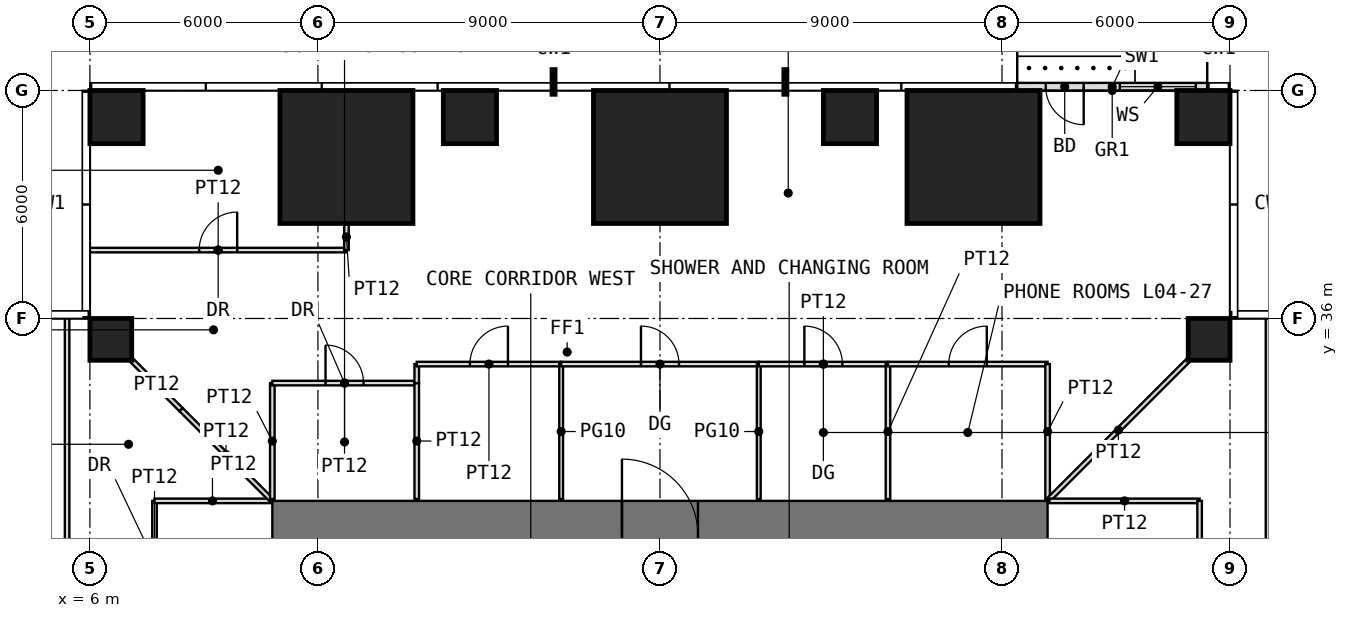
"""IFC4 building model, lengths in metres.
Left out: names, types, materials, properties, quantities, classifications, styles, units other than length and angle.
Written with IfcOpenShell. Run it as: python <this file> out.ifc"""

import sys

from ifc_helpers import new_model, si_unit, direction, frame, frame_2d, origin, origin_2d, place, context, subcontext, project, spatial, rectangle, extrude, element, fill, save


model = new_model("IFC4")
c1 = context("Model", 3, precision=1e-05, world=origin(), true_north=direction((0.0, 1.0)))
c2 = subcontext(c1, "Body", "Model", "MODEL_VIEW")
j1 = project(units=[si_unit("LENGTHUNIT", "METRE"), si_unit("PLANEANGLEUNIT", "RADIAN")], contexts=[c1])
p1 = place(None, origin())
s1 = spatial("IfcSite", under=j1, at=p1, CompositionType="ELEMENT")
p2 = place(p1, origin())
s2 = spatial("IfcBuilding", under=s1, at=p2, CompositionType="ELEMENT")
p3 = place(p2, frame((0.0, 0.0, 22.5)))
s3 = spatial("IfcBuildingStorey", under=s2, at=p3, CompositionType="ELEMENT", Elevation=22.5)
for number, where, z_axis, x_axis in (
    (1, (6.55, 35.45, 0.0), (0.0, 0.0, 1.0), (1.0, 0.0, 0.0)),
    (2, (35.45, 35.45, 0.0), (0.0, 0.0, 1.0), (1.0, 0.0, 0.0)),
):
    element("IfcColumn", number, at=place(p3, frame(where, z_axis=z_axis, x_axis=x_axis)), inside=s3, PredefinedType="COLUMN", context=c2, shape_type="SweptSolid", body=[
        extrude(rectangle(XDim=1.1, YDim=1.1, at=origin_2d()), origin(), (0.0, 0.0, 1.0), 4.0),
    ])
p4 = place(p3, frame((6.7, 41.3, 0.0), z_axis=(0.0, 0.0, 1.0), x_axis=(1.0, 0.0, 0.0)))
e3 = element("IfcColumn", 3, at=p4, inside=s3, PredefinedType="COLUMN", context=c2, shape_type="SweptSolid", body=[
    extrude(rectangle(XDim=1.4, YDim=1.4, at=origin_2d()), origin(), (0.0, 0.0, 1.0), 4.0),
])
p5 = place(p3, frame((12.75, 40.25, 0.0), z_axis=(0.0, 0.0, 1.0), x_axis=(1.0, 0.0, 0.0)))
e4 = element("IfcColumn", 4, at=p5, inside=s3, PredefinedType="COLUMN", context=c2, shape_type="SweptSolid", body=[
    extrude(rectangle(XDim=3.5, YDim=3.5, at=origin_2d()), origin(), (0.0, 0.0, 1.0), 4.0),
])
p6 = place(p3, frame((16.0, 41.3, 0.0), z_axis=(0.0, 0.0, 1.0), x_axis=(1.0, 0.0, 0.0)))
e5 = element("IfcColumn", 5, at=p6, inside=s3, PredefinedType="COLUMN", context=c2, shape_type="SweptSolid", body=[
    extrude(rectangle(XDim=1.4, YDim=1.4, at=origin_2d()), origin(), (0.0, 0.0, 1.0), 4.0),
])
p7 = place(p3, frame((21.0, 40.25, 0.0), z_axis=(0.0, 0.0, 1.0), x_axis=(1.0, 0.0, 0.0)))
e6 = element("IfcColumn", 6, at=p7, inside=s3, PredefinedType="COLUMN", context=c2, shape_type="SweptSolid", body=[
    extrude(rectangle(XDim=3.5, YDim=3.5, at=origin_2d()), origin(), (0.0, 0.0, 1.0), 4.0),
])
p8 = place(p3, frame((26.0, 41.3, 0.0), z_axis=(0.0, 0.0, 1.0), x_axis=(1.0, 0.0, 0.0)))
e7 = element("IfcColumn", 7, at=p8, inside=s3, PredefinedType="COLUMN", context=c2, shape_type="SweptSolid", body=[
    extrude(rectangle(XDim=1.4, YDim=1.4, at=origin_2d()), origin(), (0.0, 0.0, 1.0), 4.0),
])
p9 = place(p3, frame((29.25, 40.25, 0.0), z_axis=(0.0, 0.0, 1.0), x_axis=(1.0, 0.0, 0.0)))
e8 = element("IfcColumn", 8, at=p9, inside=s3, PredefinedType="COLUMN", context=c2, shape_type="SweptSolid", body=[
    extrude(rectangle(XDim=3.5, YDim=3.5, at=origin_2d()), origin(), (0.0, 0.0, 1.0), 4.0),
])
p10 = place(p3, frame((35.3, 41.3, 0.0), z_axis=(0.0, 0.0, 1.0), x_axis=(1.0, 0.0, 0.0)))
e9 = element("IfcColumn", 9, at=p10, inside=s3, PredefinedType="COLUMN", context=c2, shape_type="SweptSolid", body=[
    extrude(rectangle(XDim=1.4, YDim=1.4, at=origin_2d()), origin(), (0.0, 0.0, 1.0), 4.0),
])
p11 = place(p3, frame((35.4, 42.1, 0.0), z_axis=(0.0, 0.0, 1.0), x_axis=(-1.0, 0.0, 0.0)))
e10 = element("IfcWall", 10, at=p11, inside=s3, PredefinedType="USERDEFINED", context=c2, shape_type="SweptSolid", body=[
    extrude(rectangle(XDim=5.0, YDim=0.2, at=frame_2d((2.5, 0.0))), origin(), (0.0, 0.0, 1.0), 3.75),
])
p12 = place(p11, frame((3.25, 0.0, 0.0)))
e11 = element("IfcOpeningElement", 11, at=p12, cuts=e10, PredefinedType="OPENING", context=c2, shape_type="SweptSolid", body=[
    extrude(rectangle(XDim=1.0, YDim=2.4, at=frame_2d((0.5, 1.2))), frame((0.0, 0.11, 0.0), z_axis=(0.0, -1.0, 0.0), x_axis=(1.0, 0.0, 0.0)), (0.0, 0.0, 1.0), 0.22),
])
p13 = place(p11, frame((0.3, 0.0, 0.3)))
e12 = element("IfcOpeningElement", 12, at=p13, cuts=e10, PredefinedType="OPENING", context=c2, shape_type="SweptSolid", body=[
    extrude(rectangle(XDim=2.0, YDim=2.7, at=frame_2d((1.0, 1.35))), frame((0.0, 0.11, 0.0), z_axis=(0.0, -1.0, 0.0), x_axis=(1.0, 0.0, 0.0)), (0.0, 0.0, 1.0), 0.22),
])
p14 = place(p3, frame((10.8, 30.3, -0.05), z_axis=(0.0, 0.0, 1.0), x_axis=(1.0, 0.0, 0.0)))
e13 = element("IfcWall", 13, at=p14, inside=s3, PredefinedType="SHEAR", context=c2, shape_type="SweptSolid", body=[
    extrude(rectangle(XDim=20.4, YDim=1.8, at=frame_2d((10.2, 0.0))), origin(), (0.0, 0.0, 1.0), 4.0),
])
p15 = place(p14, frame((9.2, 0.0, 0.05)))
e14 = element("IfcOpeningElement", 14, at=p15, cuts=e13, PredefinedType="OPENING", context=c2, shape_type="SweptSolid", body=[
    extrude(rectangle(XDim=2.0, YDim=2.2, at=frame_2d((1.0, 1.1))), frame((0.0, 0.91, 0.0), z_axis=(0.0, -1.0, 0.0), x_axis=(1.0, 0.0, 0.0)), (0.0, 0.0, 1.0), 1.82),
])
p16 = place(p3, frame((5.4, 6.0, 0.0), z_axis=(0.0, 0.0, 1.0), x_axis=(0.0, 1.0, 0.0)))
e15 = element("IfcWall", 15, at=p16, inside=s3, PredefinedType="PARTITIONING", context=c2, shape_type="SweptSolid", body=[
    extrude(rectangle(XDim=30.0, YDim=0.12, at=frame_2d((15.0, 0.0))), origin(), (0.0, 0.0, 1.0), 3.75),
])
p17 = place(p16, frame((14.5, 0.0, 0.0)))
e16 = element("IfcOpeningElement", 16, at=p17, cuts=e15, PredefinedType="OPENING", context=c2, shape_type="SweptSolid", body=[
    extrude(rectangle(XDim=1.0, YDim=2.4, at=frame_2d((0.5, 1.2))), frame((0.0, 0.07, 0.0), z_axis=(0.0, -1.0, 0.0), x_axis=(1.0, 0.0, 0.0)), (0.0, 0.0, 1.0), 0.14),
])
p18 = place(p3, frame((6.0, 37.8, 0.0), z_axis=(0.0, 0.0, 1.0), x_axis=(1.0, 0.0, 0.0)))
e17 = element("IfcWall", 17, at=p18, inside=s3, PredefinedType="PARTITIONING", context=c2, shape_type="SweptSolid", body=[
    extrude(rectangle(XDim=6.75, YDim=0.12, at=frame_2d((3.375, 0.0))), origin(), (0.0, 0.0, 1.0), 3.75),
])
p19 = place(p18, frame((2.875, 0.0, 0.0)))
e18 = element("IfcOpeningElement", 18, at=p19, cuts=e17, PredefinedType="OPENING", context=c2, shape_type="SweptSolid", body=[
    extrude(rectangle(XDim=1.0, YDim=2.2, at=frame_2d((0.5, 1.1))), frame((0.0, 0.07, 0.0), z_axis=(0.0, -1.0, 0.0), x_axis=(1.0, 0.0, 0.0)), (0.0, 0.0, 1.0), 0.14),
])
p20 = place(p3, frame((7.11, 34.89, 0.0), z_axis=(0.0, 0.0, 1.0), x_axis=(0.707106781187, -0.707106781187, 0.0)))
e19 = element("IfcWall", 19, at=p20, inside=s3, PredefinedType="PARTITIONING", context=c2, shape_type="SweptSolid", body=[
    extrude(rectangle(XDim=1.822, YDim=0.12, at=frame_2d((0.911, 0.0))), origin(), (0.0, 0.0, 1.0), 3.75),
])
p21 = place(p3, frame((7.7, 28.0, 0.0), z_axis=(0.0, 0.0, 1.0), x_axis=(0.0, 1.0, 0.0)))
e20 = element("IfcWall", 20, at=p21, inside=s3, PredefinedType="PARTITIONING", context=c2, shape_type="SweptSolid", body=[
    extrude(rectangle(XDim=3.2, YDim=0.12, at=frame_2d((1.6, 0.0))), origin(), (0.0, 0.0, 1.0), 3.75),
])
p22 = place(p21, frame((1.1, 0.0, 0.0)))
e21 = element("IfcOpeningElement", 21, at=p22, cuts=e20, PredefinedType="OPENING", context=c2, shape_type="SweptSolid", body=[
    extrude(rectangle(XDim=1.0, YDim=2.2, at=frame_2d((0.5, 1.1))), frame((0.0, 0.07, 0.0), z_axis=(0.0, -1.0, 0.0), x_axis=(1.0, 0.0, 0.0)), (0.0, 0.0, 1.0), 0.14),
])
p23 = place(p3, frame((7.7, 31.2, 0.0), z_axis=(0.0, 0.0, 1.0), x_axis=(1.0, 0.0, 0.0)))
e22 = element("IfcWall", 22, at=p23, inside=s3, PredefinedType="PARTITIONING", context=c2, shape_type="SweptSolid", body=[
    extrude(rectangle(XDim=3.05, YDim=0.12, at=frame_2d((1.525, 0.0))), origin(), (0.0, 0.0, 1.0), 3.75),
])
p24 = place(p3, frame((8.398, 33.602, 0.0), z_axis=(0.0, 0.0, 1.0), x_axis=(0.707106781187, -0.707106781187, 0.0)))
e23 = element("IfcWall", 23, at=p24, inside=s3, PredefinedType="PARTITIONING", context=c2, shape_type="SweptSolid", body=[
    extrude(rectangle(XDim=3.346, YDim=0.12, at=frame_2d((1.673, 0.0))), origin(), (0.0, 0.0, 1.0), 3.75),
])
p25 = place(p3, frame((10.8, 31.25, 0.0), z_axis=(0.0, 0.0, 1.0), x_axis=(0.0, 1.0, 0.0)))
e24 = element("IfcWall", 24, at=p25, inside=s3, PredefinedType="PARTITIONING", context=c2, shape_type="SweptSolid", body=[
    extrude(rectangle(XDim=3.05, YDim=0.12, at=frame_2d((1.525, 0.0))), origin(), (0.0, 0.0, 1.0), 3.75),
])
p26 = place(p3, frame((10.8, 34.3, 0.0), z_axis=(0.0, 0.0, 1.0), x_axis=(1.0, 0.0, 0.0)))
e25 = element("IfcWall", 25, at=p26, inside=s3, PredefinedType="PARTITIONING", context=c2, shape_type="SweptSolid", body=[
    extrude(rectangle(XDim=3.8, YDim=0.12, at=frame_2d((1.9, 0.0))), origin(), (0.0, 0.0, 1.0), 3.75),
])
p27 = place(p26, frame((1.4, 0.0, 0.0)))
e26 = element("IfcOpeningElement", 26, at=p27, cuts=e25, PredefinedType="OPENING", context=c2, shape_type="SweptSolid", body=[
    extrude(rectangle(XDim=1.0, YDim=2.2, at=frame_2d((0.5, 1.1))), frame((0.0, 0.07, 0.0), z_axis=(0.0, -1.0, 0.0), x_axis=(1.0, 0.0, 0.0)), (0.0, 0.0, 1.0), 0.14),
])
p28 = place(p3, frame((12.75, 37.8, 0.0), z_axis=(0.0, 0.0, 1.0), x_axis=(0.0, 1.0, 0.0)))
e27 = element("IfcWall", 27, at=p28, inside=s3, PredefinedType="PARTITIONING", context=c2, shape_type="SweptSolid", body=[
    extrude(rectangle(XDim=0.69, YDim=0.12, at=frame_2d((0.345, 0.0))), origin(), (0.0, 0.0, 1.0), 3.75),
])
p29 = place(p3, frame((14.6, 31.25, 0.0), z_axis=(0.0, 0.0, 1.0), x_axis=(0.0, 1.0, 0.0)))
e28 = element("IfcWall", 28, at=p29, inside=s3, PredefinedType="PARTITIONING", context=c2, shape_type="SweptSolid", body=[
    extrude(rectangle(XDim=3.05, YDim=0.12, at=frame_2d((1.525, 0.0))), origin(), (0.0, 0.0, 1.0), 3.75),
])
p30 = place(p3, frame((14.6, 34.3, 0.0), z_axis=(0.0, 0.0, 1.0), x_axis=(0.0, 1.0, 0.0)))
e29 = element("IfcWall", 29, at=p30, inside=s3, PredefinedType="PARTITIONING", context=c2, shape_type="SweptSolid", body=[
    extrude(rectangle(XDim=0.5, YDim=0.12, at=frame_2d((0.25, 0.0))), origin(), (0.0, 0.0, 1.0), 3.75),
])
p31 = place(p3, frame((14.6, 34.8, 0.0), z_axis=(0.0, 0.0, 1.0), x_axis=(1.0, 0.0, 0.0)))
e30 = element("IfcWall", 30, at=p31, inside=s3, PredefinedType="PARTITIONING", context=c2, shape_type="SweptSolid", body=[
    extrude(rectangle(XDim=3.8, YDim=0.12, at=frame_2d((1.9, 0.0))), origin(), (0.0, 0.0, 1.0), 3.75),
])
p32 = place(p31, frame((1.4, 0.0, 0.0)))
e31 = element("IfcOpeningElement", 31, at=p32, cuts=e30, PredefinedType="OPENING", context=c2, shape_type="SweptSolid", body=[
    extrude(rectangle(XDim=1.0, YDim=2.4, at=frame_2d((0.5, 1.2))), frame((0.0, 0.07, 0.0), z_axis=(0.0, -1.0, 0.0), x_axis=(1.0, 0.0, 0.0)), (0.0, 0.0, 1.0), 0.14),
])
p33 = place(p3, frame((18.4, 31.25, 0.0), z_axis=(0.0, 0.0, 1.0), x_axis=(0.0, 1.0, 0.0)))
e32 = element("IfcWall", 32, at=p33, inside=s3, PredefinedType="PARTITIONING", context=c2, shape_type="SweptSolid", body=[
    extrude(rectangle(XDim=3.55, YDim=0.1, at=frame_2d((1.775, 0.0))), origin(), (0.0, 0.0, 1.0), 3.75),
])
p34 = place(p3, frame((18.4, 34.8, 0.0), z_axis=(0.0, 0.0, 1.0), x_axis=(1.0, 0.0, 0.0)))
e33 = element("IfcWall", 33, at=p34, inside=s3, PredefinedType="PARTITIONING", context=c2, shape_type="SweptSolid", body=[
    extrude(rectangle(XDim=5.2, YDim=0.12, at=frame_2d((2.6, 0.0))), origin(), (0.0, 0.0, 1.0), 3.75),
])
p35 = place(p34, frame((2.1, 0.0, 0.0)))
e34 = element("IfcOpeningElement", 34, at=p35, cuts=e33, PredefinedType="OPENING", context=c2, shape_type="SweptSolid", body=[
    extrude(rectangle(XDim=1.0, YDim=2.4, at=frame_2d((0.5, 1.2))), frame((0.0, 0.07, 0.0), z_axis=(0.0, -1.0, 0.0), x_axis=(1.0, 0.0, 0.0)), (0.0, 0.0, 1.0), 0.14),
])
p36 = place(p3, frame((23.6, 31.25, 0.0), z_axis=(0.0, 0.0, 1.0), x_axis=(0.0, 1.0, 0.0)))
e35 = element("IfcWall", 35, at=p36, inside=s3, PredefinedType="PARTITIONING", context=c2, shape_type="SweptSolid", body=[
    extrude(rectangle(XDim=3.55, YDim=0.1, at=frame_2d((1.775, 0.0))), origin(), (0.0, 0.0, 1.0), 3.75),
])
p37 = place(p3, frame((23.6, 34.8, 0.0), z_axis=(0.0, 0.0, 1.0), x_axis=(1.0, 0.0, 0.0)))
e36 = element("IfcWall", 36, at=p37, inside=s3, PredefinedType="PARTITIONING", context=c2, shape_type="SweptSolid", body=[
    extrude(rectangle(XDim=3.4, YDim=0.12, at=frame_2d((1.7, 0.0))), origin(), (0.0, 0.0, 1.0), 3.75),
])
p38 = place(p37, frame((1.2, 0.0, 0.0)))
e37 = element("IfcOpeningElement", 37, at=p38, cuts=e36, PredefinedType="OPENING", context=c2, shape_type="SweptSolid", body=[
    extrude(rectangle(XDim=1.0, YDim=2.4, at=frame_2d((0.5, 1.2))), frame((0.0, 0.07, 0.0), z_axis=(0.0, -1.0, 0.0), x_axis=(1.0, 0.0, 0.0)), (0.0, 0.0, 1.0), 0.14),
])
p39 = place(p3, frame((27.0, 31.25, 0.0), z_axis=(0.0, 0.0, 1.0), x_axis=(0.0, 1.0, 0.0)))
e38 = element("IfcWall", 38, at=p39, inside=s3, PredefinedType="PARTITIONING", context=c2, shape_type="SweptSolid", body=[
    extrude(rectangle(XDim=3.55, YDim=0.12, at=frame_2d((1.775, 0.0))), origin(), (0.0, 0.0, 1.0), 3.75),
])
p40 = place(p3, frame((27.0, 34.8, 0.0), z_axis=(0.0, 0.0, 1.0), x_axis=(1.0, 0.0, 0.0)))
e39 = element("IfcWall", 39, at=p40, inside=s3, PredefinedType="PARTITIONING", context=c2, shape_type="SweptSolid", body=[
    extrude(rectangle(XDim=4.2, YDim=0.12, at=frame_2d((2.1, 0.0))), origin(), (0.0, 0.0, 1.0), 3.75),
])
p41 = place(p40, frame((1.6, 0.0, 0.0)))
e40 = element("IfcOpeningElement", 40, at=p41, cuts=e39, PredefinedType="OPENING", context=c2, shape_type="SweptSolid", body=[
    extrude(rectangle(XDim=1.0, YDim=2.4, at=frame_2d((0.5, 1.2))), frame((0.0, 0.07, 0.0), z_axis=(0.0, -1.0, 0.0), x_axis=(1.0, 0.0, 0.0)), (0.0, 0.0, 1.0), 0.14),
])
p42 = place(p3, frame((31.2, 31.25, 0.0), z_axis=(0.0, 0.0, 1.0), x_axis=(0.0, 1.0, 0.0)))
e41 = element("IfcWall", 41, at=p42, inside=s3, PredefinedType="PARTITIONING", context=c2, shape_type="SweptSolid", body=[
    extrude(rectangle(XDim=3.55, YDim=0.12, at=frame_2d((1.775, 0.0))), origin(), (0.0, 0.0, 1.0), 3.75),
])
p43 = place(p3, frame((31.235, 31.235, 0.0), z_axis=(0.0, 0.0, 1.0), x_axis=(0.707106781187, 0.707106781187, 0.0)))
e42 = element("IfcWall", 42, at=p43, inside=s3, PredefinedType="PARTITIONING", context=c2, shape_type="SweptSolid", body=[
    extrude(rectangle(XDim=5.168, YDim=0.12, at=frame_2d((2.584, 0.0))), origin(), (0.0, 0.0, 1.0), 3.75),
])
p44 = place(p3, frame((31.25, 31.2, 0.0), z_axis=(0.0, 0.0, 1.0), x_axis=(1.0, 0.0, 0.0)))
e43 = element("IfcWall", 43, at=p44, inside=s3, PredefinedType="PARTITIONING", context=c2, shape_type="SweptSolid", body=[
    extrude(rectangle(XDim=3.95, YDim=0.12, at=frame_2d((1.975, 0.0))), origin(), (0.0, 0.0, 1.0), 3.75),
])
p45 = place(p3, frame((35.2, 24.0, 0.0), z_axis=(0.0, 0.0, 1.0), x_axis=(0.0, 1.0, 0.0)))
e44 = element("IfcWall", 44, at=p45, inside=s3, PredefinedType="PARTITIONING", context=c2, shape_type="SweptSolid", body=[
    extrude(rectangle(XDim=7.2, YDim=0.12, at=frame_2d((3.6, 0.0))), origin(), (0.0, 0.0, 1.0), 3.75),
])
p46 = place(p45, frame((2.7, 0.0, 0.0)))
e45 = element("IfcOpeningElement", 45, at=p46, cuts=e44, PredefinedType="OPENING", context=c2, shape_type="SweptSolid", body=[
    extrude(rectangle(XDim=1.8, YDim=2.4, at=frame_2d((0.9, 1.2))), frame((0.0, 0.07, 0.0), z_axis=(0.0, -1.0, 0.0), x_axis=(1.0, 0.0, 0.0)), (0.0, 0.0, 1.0), 0.14),
])
p47 = place(p3, frame((37.0, 6.0, 0.0), z_axis=(0.0, 0.0, 1.0), x_axis=(0.0, 1.0, 0.0)))
e46 = element("IfcWall", 46, at=p47, inside=s3, PredefinedType="PARTITIONING", context=c2, shape_type="SweptSolid", body=[
    extrude(rectangle(XDim=30.0, YDim=0.12, at=frame_2d((15.0, 0.0))), origin(), (0.0, 0.0, 1.0), 3.75),
])
p48 = place(p47, frame((14.5, 0.0, 0.0)))
e47 = element("IfcOpeningElement", 47, at=p48, cuts=e46, PredefinedType="OPENING", context=c2, shape_type="SweptSolid", body=[
    extrude(rectangle(XDim=1.0, YDim=2.4, at=frame_2d((0.5, 1.2))), frame((0.0, 0.07, 0.0), z_axis=(0.0, -1.0, 0.0), x_axis=(1.0, 0.0, 0.0)), (0.0, 0.0, 1.0), 0.14),
])
p49 = place(p12, origin())
e48 = element("IfcDoor", 48, at=p49, inside=s3, OperationType="SINGLE_SWING_LEFT", PredefinedType="DOOR", context=c2, shape_type="SweptSolid", body=[
    extrude(rectangle(XDim=1.0, YDim=2.4, at=frame_2d((0.5, 1.2))), frame((0.0, 0.025, 0.0), z_axis=(0.0, -1.0, 0.0), x_axis=(1.0, 0.0, 0.0)), (0.0, 0.0, 1.0), 0.05),
])
fill(e11, e48)
p50 = place(p13, origin())
e49 = element("IfcWindow", 49, at=p50, inside=s3, PartitioningType="SINGLE_PANEL", PredefinedType="WINDOW", context=c2, shape_type="SweptSolid", body=[
    extrude(rectangle(XDim=2.0, YDim=2.7, at=frame_2d((1.0, 1.35))), frame((0.0, 0.03, 0.0), z_axis=(0.0, -1.0, 0.0), x_axis=(1.0, 0.0, 0.0)), (0.0, 0.0, 1.0), 0.06),
])
fill(e12, e49)
p51 = place(p15, origin())
e50 = element("IfcDoor", 50, at=p51, inside=s3, OperationType="DOUBLE_DOOR_SINGLE_SWING", PredefinedType="DOOR", context=c2, shape_type="SweptSolid", body=[
    extrude(rectangle(XDim=2.0, YDim=2.2, at=frame_2d((1.0, 1.1))), frame((0.0, 0.025, 0.0), z_axis=(0.0, -1.0, 0.0), x_axis=(1.0, 0.0, 0.0)), (0.0, 0.0, 1.0), 0.05),
])
fill(e14, e50)
p52 = place(p27, origin())
e51 = element("IfcDoor", 51, at=p52, inside=s3, OperationType="SINGLE_SWING_LEFT", PredefinedType="DOOR", context=c2, shape_type="SweptSolid", body=[
    extrude(rectangle(XDim=1.0, YDim=2.2, at=frame_2d((0.5, 1.1))), frame((0.0, 0.025, 0.0), z_axis=(0.0, -1.0, 0.0), x_axis=(1.0, 0.0, 0.0)), (0.0, 0.0, 1.0), 0.05),
])
fill(e26, e51)
p53 = place(p32, origin())
e52 = element("IfcDoor", 52, at=p53, inside=s3, OperationType="SINGLE_SWING_RIGHT", PredefinedType="DOOR", context=c2, shape_type="SweptSolid", body=[
    extrude(rectangle(XDim=1.0, YDim=2.4, at=frame_2d((0.5, 1.2))), frame((0.0, 0.025, 0.0), z_axis=(0.0, -1.0, 0.0), x_axis=(1.0, 0.0, 0.0)), (0.0, 0.0, 1.0), 0.05),
])
fill(e31, e52)
p54 = place(p38, origin())
e53 = element("IfcDoor", 53, at=p54, inside=s3, OperationType="SINGLE_SWING_LEFT", PredefinedType="DOOR", context=c2, shape_type="SweptSolid", body=[
    extrude(rectangle(XDim=1.0, YDim=2.4, at=frame_2d((0.5, 1.2))), frame((0.0, 0.025, 0.0), z_axis=(0.0, -1.0, 0.0), x_axis=(1.0, 0.0, 0.0)), (0.0, 0.0, 1.0), 0.05),
])
fill(e37, e53)
p55 = place(p41, origin())
e54 = element("IfcDoor", 54, at=p55, inside=s3, OperationType="SINGLE_SWING_RIGHT", PredefinedType="DOOR", context=c2, shape_type="SweptSolid", body=[
    extrude(rectangle(XDim=1.0, YDim=2.4, at=frame_2d((0.5, 1.2))), frame((0.0, 0.025, 0.0), z_axis=(0.0, -1.0, 0.0), x_axis=(1.0, 0.0, 0.0)), (0.0, 0.0, 1.0), 0.05),
])
fill(e40, e54)
p56 = place(p19, origin())
e55 = element("IfcDoor", 55, at=p56, inside=s3, OperationType="SINGLE_SWING_RIGHT", PredefinedType="DOOR", context=c2, shape_type="SweptSolid", body=[
    extrude(rectangle(XDim=1.0, YDim=2.2, at=frame_2d((0.5, 1.1))), frame((0.0, 0.025, 0.0), z_axis=(0.0, -1.0, 0.0), x_axis=(1.0, 0.0, 0.0)), (0.0, 0.0, 1.0), 0.05),
])
fill(e18, e55)
p57 = place(p35, origin())
e56 = element("IfcDoor", 56, at=p57, inside=s3, OperationType="SINGLE_SWING_LEFT", PredefinedType="DOOR", context=c2, shape_type="SweptSolid", body=[
    extrude(rectangle(XDim=1.0, YDim=2.4, at=frame_2d((0.5, 1.2))), frame((0.0, 0.025, 0.0), z_axis=(0.0, -1.0, 0.0), x_axis=(1.0, 0.0, 0.0)), (0.0, 0.0, 1.0), 0.05),
])
fill(e34, e56)
save(model, sys.argv[1])
